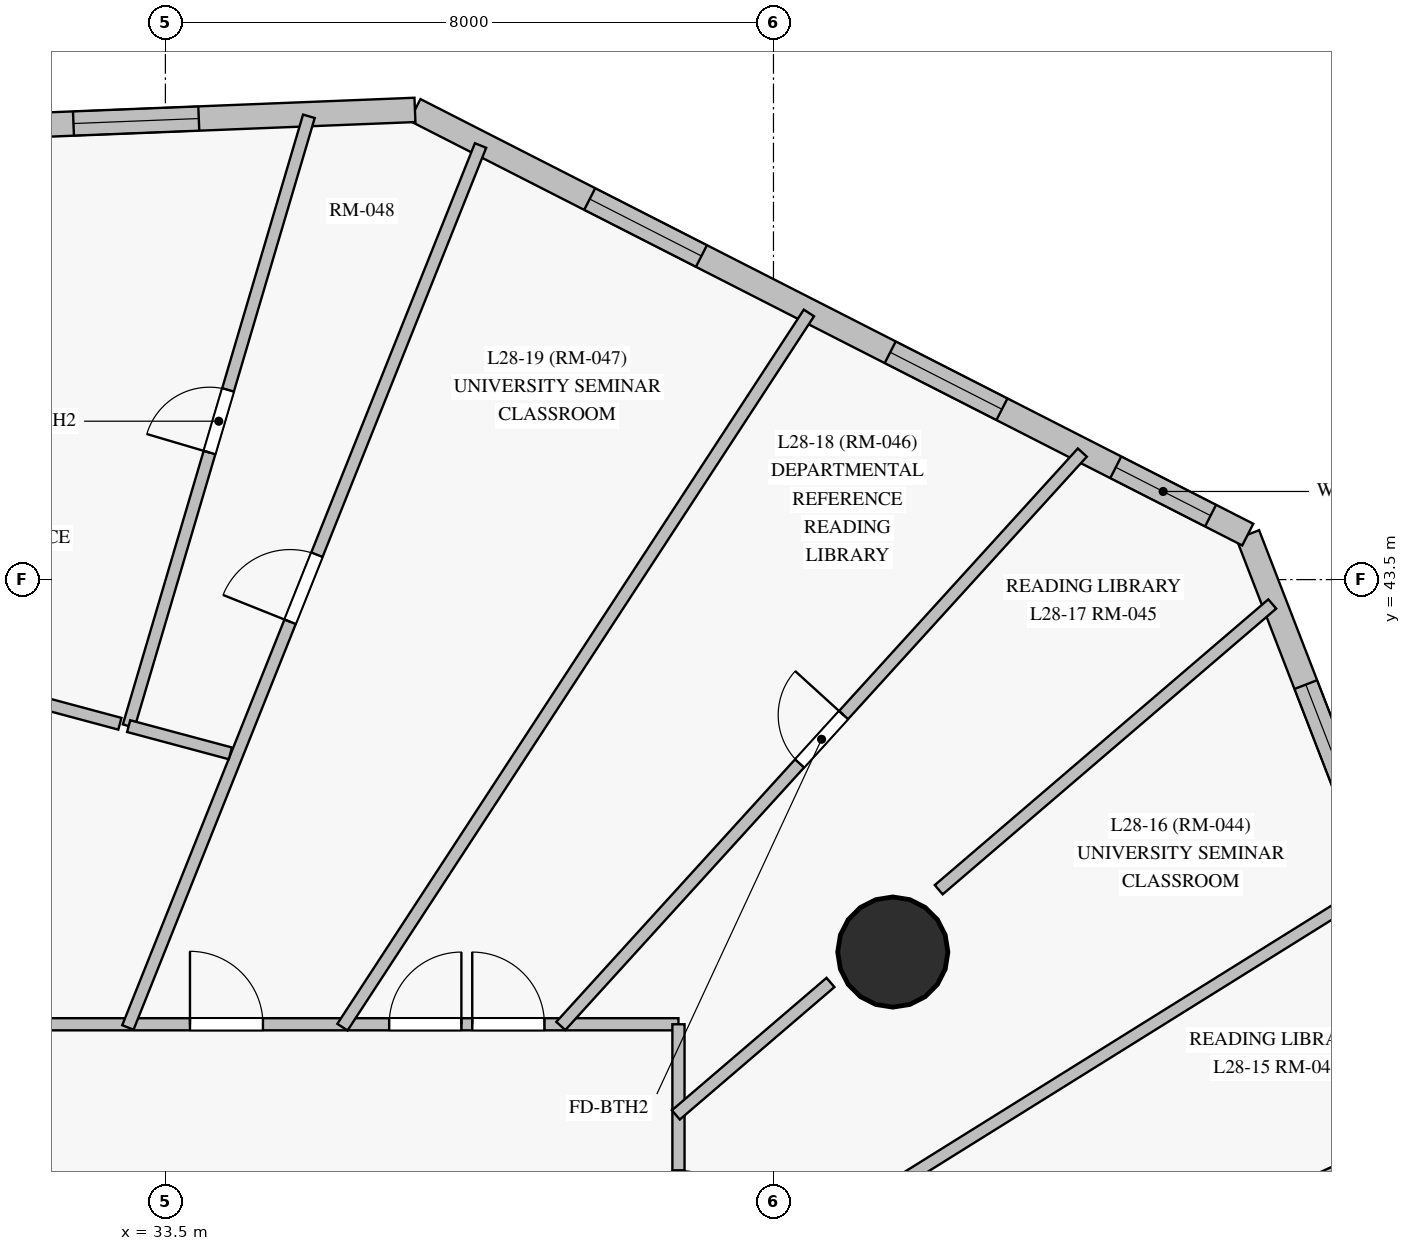
"""IFC4 building model, lengths in metres.
Left out: names, types, materials, properties, quantities, classifications, styles, units other than length and angle.
Written with IfcOpenShell. Run it as: python <this file> out.ifc"""

import sys

from ifc_helpers import new_model, si_unit, direction, frame, frame_2d, origin, origin_with_axes, origin_2d, place, context, subcontext, project, spatial, rectangle, circle, extrude, source, transform, mapped, element, fill, save


model = new_model("IFC4")
c1 = context("Model", 3, precision=1e-05, world=origin(), true_north=direction((0.0, 1.0)))
c2 = subcontext(c1, "Body", "Model", "MODEL_VIEW")
j1 = project(units=[si_unit("LENGTHUNIT", "METRE"), si_unit("PLANEANGLEUNIT", "RADIAN")], contexts=[c1])
p1 = place(None, origin())
s1 = spatial("IfcSite", under=j1, at=p1, CompositionType="ELEMENT")
p2 = place(p1, origin())
s2 = spatial("IfcBuilding", under=s1, at=p2, CompositionType="ELEMENT")
p3 = place(p2, frame((0.0, 0.0, 105.35)))
s3 = spatial("IfcBuildingStorey", under=s2, at=p3, CompositionType="ELEMENT", Elevation=105.35)
m1 = source(origin_with_axes(), c2, "Body", "SweptSolid", [
    extrude(circle(Radius=0.725, at=origin_2d()), origin(), (0.0, 0.0, 1.0), 3.05),
])
p4 = place(p3, frame((43.07, 38.6, 0.0), z_axis=(0.0, 0.0, 1.0), x_axis=(1.0, 0.0, 0.0)))
e1 = element("IfcColumn", 1, at=p4, inside=s3, PredefinedType="COLUMN", context=c2, shape_type="MappedRepresentation", body=[
    mapped(m1, transform((0.0, 0.0, 0.0), scale=1.0)),
])
p5 = place(p3, frame((51.296, 34.899, 0.0), z_axis=(0.0, 0.0, 1.0), x_axis=(-0.360827329773, 0.932632638336, 0.0)))
e2 = element("IfcWall", 2, at=p5, inside=s3, PredefinedType="SOLIDWALL", context=c2, shape_type="SweptSolid", body=[
    extrude(rectangle(XDim=9.857, YDim=0.32, at=frame_2d((4.928, 0.0))), origin(), (0.0, 0.0, 1.0), 2.825),
])
p6 = place(p5, frame((2.517, 0.0, 0.85)))
e3 = element("IfcOpeningElement", 3, at=p6, cuts=e2, PredefinedType="OPENING", context=c2, shape_type="SweptSolid", body=[
    extrude(rectangle(XDim=1.65, YDim=1.65, at=frame_2d((0.825, 0.825))), frame((0.0, 0.17, 0.0), z_axis=(0.0, -1.0, 0.0), x_axis=(1.0, 0.0, 0.0)), (0.0, 0.0, 1.0), 0.34),
])
p7 = place(p5, frame((6.091, 0.0, 0.85)))
e4 = element("IfcOpeningElement", 4, at=p7, cuts=e2, PredefinedType="OPENING", context=c2, shape_type="SweptSolid", body=[
    extrude(rectangle(XDim=1.65, YDim=1.65, at=frame_2d((0.825, 0.825))), frame((0.0, 0.17, 0.0), z_axis=(0.0, -1.0, 0.0), x_axis=(1.0, 0.0, 0.0)), (0.0, 0.0, 1.0), 0.34),
])
p8 = place(p3, frame((47.74, 44.092, 0.0), z_axis=(0.0, 0.0, 1.0), x_axis=(-0.890845819917, 0.454305761725, 0.0)))
e5 = element("IfcWall", 5, at=p8, inside=s3, PredefinedType="SOLIDWALL", context=c2, shape_type="SweptSolid", body=[
    extrude(rectangle(XDim=12.299, YDim=0.32, at=frame_2d((6.15, 0.0))), origin(), (0.0, 0.0, 1.0), 2.825),
])
p9 = place(p8, frame((0.549, 0.0, 0.85)))
e6 = element("IfcOpeningElement", 6, at=p9, cuts=e5, PredefinedType="OPENING", context=c2, shape_type="SweptSolid", body=[
    extrude(rectangle(XDim=1.4, YDim=1.65, at=frame_2d((0.7, 0.825))), frame((0.0, 0.17, 0.0), z_axis=(0.0, -1.0, 0.0), x_axis=(1.0, 0.0, 0.0)), (0.0, 0.0, 1.0), 0.34),
])
p10 = place(p8, frame((3.63, 0.0, 0.85)))
e7 = element("IfcOpeningElement", 7, at=p10, cuts=e5, PredefinedType="OPENING", context=c2, shape_type="SweptSolid", body=[
    extrude(rectangle(XDim=1.65, YDim=1.65, at=frame_2d((0.825, 0.825))), frame((0.0, 0.17, 0.0), z_axis=(0.0, -1.0, 0.0), x_axis=(1.0, 0.0, 0.0)), (0.0, 0.0, 1.0), 0.34),
])
p11 = place(p8, frame((8.068, 0.0, 0.85)))
e8 = element("IfcOpeningElement", 8, at=p11, cuts=e5, PredefinedType="OPENING", context=c2, shape_type="SweptSolid", body=[
    extrude(rectangle(XDim=1.65, YDim=1.65, at=frame_2d((0.825, 0.825))), frame((0.0, 0.17, 0.0), z_axis=(0.0, -1.0, 0.0), x_axis=(1.0, 0.0, 0.0)), (0.0, 0.0, 1.0), 0.34),
])
p12 = place(p3, frame((36.783, 49.679, 0.0), z_axis=(0.0, 0.0, 1.0), x_axis=(-0.999202063829, -0.039940401087, 0.0)))
e9 = element("IfcWall", 9, at=p12, inside=s3, PredefinedType="SOLIDWALL", context=c2, shape_type="SweptSolid", body=[
    extrude(rectangle(XDim=9.878, YDim=0.32, at=frame_2d((4.939, 0.0))), origin(), (0.0, 0.0, 1.0), 2.825),
])
p13 = place(p12, frame((2.846, 0.0, 0.85)))
e10 = element("IfcOpeningElement", 10, at=p13, cuts=e9, PredefinedType="OPENING", context=c2, shape_type="SweptSolid", body=[
    extrude(rectangle(XDim=1.65, YDim=1.65, at=frame_2d((0.825, 0.825))), frame((0.0, 0.17, 0.0), z_axis=(0.0, -1.0, 0.0), x_axis=(1.0, 0.0, 0.0)), (0.0, 0.0, 1.0), 0.34),
])
p14 = place(p12, frame((6.731, 0.0, 0.85)))
e11 = element("IfcOpeningElement", 11, at=p14, cuts=e9, PredefinedType="OPENING", context=c2, shape_type="SweptSolid", body=[
    extrude(rectangle(XDim=1.65, YDim=1.65, at=frame_2d((0.825, 0.825))), frame((0.0, 0.17, 0.0), z_axis=(0.0, -1.0, 0.0), x_axis=(1.0, 0.0, 0.0)), (0.0, 0.0, 1.0), 0.34),
])
p15 = place(p3, frame((11.018, 37.65, 0.0), z_axis=(0.0, 0.0, 1.0), x_axis=(1.0, 0.0, 0.0)))
e12 = element("IfcWall", 12, at=p15, inside=s3, PredefinedType="PARTITIONING", context=c2, shape_type="SweptSolid", body=[
    extrude(rectangle(XDim=29.232, YDim=0.16, at=frame_2d((14.616, 0.0))), origin(), (0.0, 0.0, 1.0), 2.325),
])
p16 = place(p15, frame((26.519, 0.0, 0.0)))
e13 = element("IfcOpeningElement", 13, at=p16, cuts=e12, PredefinedType="OPENING", context=c2, shape_type="SweptSolid", body=[
    extrude(rectangle(XDim=0.95, YDim=2.15, at=frame_2d((0.475, 1.075))), frame((0.0, 0.09, 0.0), z_axis=(0.0, -1.0, 0.0), x_axis=(1.0, 0.0, 0.0)), (0.0, 0.0, 1.0), 0.18),
])
p17 = place(p15, frame((25.426, 0.0, 0.0)))
e14 = element("IfcOpeningElement", 14, at=p17, cuts=e12, PredefinedType="OPENING", context=c2, shape_type="SweptSolid", body=[
    extrude(rectangle(XDim=0.95, YDim=2.15, at=frame_2d((0.475, 1.075))), frame((0.0, 0.09, 0.0), z_axis=(0.0, -1.0, 0.0), x_axis=(1.0, 0.0, 0.0)), (0.0, 0.0, 1.0), 0.18),
])
p18 = place(p15, frame((22.805, 0.0, 0.0)))
e15 = element("IfcOpeningElement", 15, at=p18, cuts=e12, PredefinedType="OPENING", context=c2, shape_type="SweptSolid", body=[
    extrude(rectangle(XDim=0.96, YDim=2.15, at=frame_2d((0.48, 1.075))), frame((0.0, 0.09, 0.0), z_axis=(0.0, -1.0, 0.0), x_axis=(1.0, 0.0, 0.0)), (0.0, 0.0, 1.0), 0.18),
])
p19 = place(p15, frame((14.375, 0.0, 0.0)))
e16 = element("IfcOpeningElement", 16, at=p19, cuts=e12, PredefinedType="OPENING", context=c2, shape_type="SweptSolid", body=[
    extrude(rectangle(XDim=0.96, YDim=2.15, at=frame_2d((0.48, 1.075))), frame((0.0, 0.09, 0.0), z_axis=(0.0, -1.0, 0.0), x_axis=(1.0, 0.0, 0.0)), (0.0, 0.0, 1.0), 0.18),
])
p20 = place(p15, frame((9.717, 0.0, 0.0)))
e17 = element("IfcOpeningElement", 17, at=p20, cuts=e12, PredefinedType="OPENING", context=c2, shape_type="SweptSolid", body=[
    extrude(rectangle(XDim=0.95, YDim=2.15, at=frame_2d((0.475, 1.075))), frame((0.0, 0.09, 0.0), z_axis=(0.0, -1.0, 0.0), x_axis=(1.0, 0.0, 0.0)), (0.0, 0.0, 1.0), 0.18),
])
p21 = place(p15, frame((10.845, 0.0, 0.0)))
e18 = element("IfcOpeningElement", 18, at=p21, cuts=e12, PredefinedType="OPENING", context=c2, shape_type="SweptSolid", body=[
    extrude(rectangle(XDim=0.96, YDim=2.15, at=frame_2d((0.48, 1.075))), frame((0.0, 0.09, 0.0), z_axis=(0.0, -1.0, 0.0), x_axis=(1.0, 0.0, 0.0)), (0.0, 0.0, 1.0), 0.18),
])
p22 = place(p15, frame((1.751, 0.0, 0.0)))
e19 = element("IfcOpeningElement", 19, at=p22, cuts=e12, PredefinedType="OPENING", context=c2, shape_type="SweptSolid", body=[
    extrude(rectangle(XDim=0.86, YDim=2.04, at=frame_2d((0.43, 1.02))), frame((0.0, 0.09, 0.0), z_axis=(0.0, -1.0, 0.0), x_axis=(1.0, 0.0, 0.0)), (0.0, 0.0, 1.0), 0.18),
])
p23 = place(p3, frame((40.25, 37.65, 0.0), z_axis=(0.0, 0.0, 1.0), x_axis=(0.0, -1.0, 0.0)))
e20 = element("IfcWall", 20, at=p23, inside=s3, PredefinedType="PARTITIONING", context=c2, shape_type="SweptSolid", body=[
    extrude(rectangle(XDim=22.3, YDim=0.16, at=frame_2d((11.15, 0.0))), origin(), (0.0, 0.0, 1.0), 2.225),
])
p24 = place(p23, frame((14.02, 0.0, 0.0)))
e21 = element("IfcOpeningElement", 21, at=p24, cuts=e20, PredefinedType="OPENING", context=c2, shape_type="SweptSolid", body=[
    extrude(rectangle(XDim=0.95, YDim=2.15, at=frame_2d((0.475, 1.075))), frame((0.0, 0.09, 0.0), z_axis=(0.0, -1.0, 0.0), x_axis=(1.0, 0.0, 0.0)), (0.0, 0.0, 1.0), 0.18),
])
p25 = place(p23, frame((10.675, 0.0, 0.0)))
e22 = element("IfcOpeningElement", 22, at=p25, cuts=e20, PredefinedType="OPENING", context=c2, shape_type="SweptSolid", body=[
    extrude(rectangle(XDim=0.95, YDim=2.15, at=frame_2d((0.475, 1.075))), frame((0.0, 0.09, 0.0), z_axis=(0.0, -1.0, 0.0), x_axis=(1.0, 0.0, 0.0)), (0.0, 0.0, 1.0), 0.18),
])
p26 = place(p23, frame((6.207, 0.0, 0.0)))
e23 = element("IfcOpeningElement", 23, at=p26, cuts=e20, PredefinedType="OPENING", context=c2, shape_type="SweptSolid", body=[
    extrude(rectangle(XDim=0.95, YDim=2.15, at=frame_2d((0.475, 1.075))), frame((0.0, 0.09, 0.0), z_axis=(0.0, -1.0, 0.0), x_axis=(1.0, 0.0, 0.0)), (0.0, 0.0, 1.0), 0.18),
])
p27 = place(p23, frame((4.298, 0.0, 0.0)))
e24 = element("IfcOpeningElement", 24, at=p27, cuts=e20, PredefinedType="OPENING", context=c2, shape_type="SweptSolid", body=[
    extrude(rectangle(XDim=0.95, YDim=2.15, at=frame_2d((0.475, 1.075))), frame((0.0, 0.09, 0.0), z_axis=(0.0, -1.0, 0.0), x_axis=(1.0, 0.0, 0.0)), (0.0, 0.0, 1.0), 0.18),
])
p28 = place(p23, frame((1.923, 0.0, 0.0)))
e25 = element("IfcOpeningElement", 25, at=p28, cuts=e20, PredefinedType="OPENING", context=c2, shape_type="SweptSolid", body=[
    extrude(rectangle(XDim=0.96, YDim=2.15, at=frame_2d((0.48, 1.075))), frame((0.0, 0.09, 0.0), z_axis=(0.0, -1.0, 0.0), x_axis=(1.0, 0.0, 0.0)), (0.0, 0.0, 1.0), 0.18),
])
p29 = place(p3, frame((33.007, 37.608, 0.0), z_axis=(0.0, 0.0, 1.0), x_axis=(0.371289618401, 0.928517107687, 0.0)))
e26 = element("IfcWall", 26, at=p29, inside=s3, PredefinedType="PARTITIONING", context=c2, shape_type="SweptSolid", body=[
    extrude(rectangle(XDim=12.496, YDim=0.16, at=frame_2d((6.248, 0.0))), origin(), (0.0, 0.0, 1.0), 2.825),
])
p30 = place(p29, frame((5.748, 0.0, 0.0)))
e27 = element("IfcOpeningElement", 27, at=p30, cuts=e26, PredefinedType="OPENING", context=c2, shape_type="SweptSolid", body=[
    extrude(rectangle(XDim=0.95, YDim=2.15, at=frame_2d((0.475, 1.075))), frame((0.0, 0.09, 0.0), z_axis=(0.0, -1.0, 0.0), x_axis=(1.0, 0.0, 0.0)), (0.0, 0.0, 1.0), 0.18),
])
p31 = place(p3, frame((40.223, 31.765, 0.0), z_axis=(0.0, 0.0, 1.0), x_axis=(0.910305874459, 0.413936245, 0.0)))
e28 = element("IfcWall", 28, at=p31, inside=s3, PredefinedType="PARTITIONING", context=c2, shape_type="SweptSolid", body=[
    extrude(rectangle(XDim=11.453, YDim=0.16, at=frame_2d((5.727, 0.0))), origin(), (0.0, 0.0, 1.0), 2.825),
])
p32 = place(p3, frame((35.83, 37.612, 0.0), z_axis=(0.0, 0.0, 1.0), x_axis=(0.546828428928, 0.837244689034, 0.0)))
e29 = element("IfcWall", 29, at=p32, inside=s3, PredefinedType="PARTITIONING", context=c2, shape_type="SweptSolid", body=[
    extrude(rectangle(XDim=11.222, YDim=0.16, at=frame_2d((5.611, 0.0))), origin(), (0.0, 0.0, 1.0), 2.825),
])
p33 = place(p3, frame((40.225, 33.742, 0.0), z_axis=(0.0, 0.0, 1.0), x_axis=(0.848478174112, 0.52923037333, 0.0)))
e30 = element("IfcWall", 30, at=p33, inside=s3, PredefinedType="PARTITIONING", context=c2, shape_type="SweptSolid", body=[
    extrude(rectangle(XDim=10.91, YDim=0.16, at=frame_2d((5.455, 0.0))), origin(), (0.0, 0.0, 1.0), 2.825),
])
p34 = place(p3, frame((38.702, 37.628, 0.0), z_axis=(0.0, 0.0, 1.0), x_axis=(0.672855104657, 0.739774295402, 0.0)))
e31 = element("IfcWall", 31, at=p34, inside=s3, PredefinedType="PARTITIONING", context=c2, shape_type="SweptSolid", body=[
    extrude(rectangle(XDim=10.197, YDim=0.16, at=frame_2d((5.099, 0.0))), origin(), (0.0, 0.0, 1.0), 2.825),
])
p35 = place(p34, frame((4.668, 0.0, 0.0)))
e32 = element("IfcOpeningElement", 32, at=p35, cuts=e31, PredefinedType="OPENING", context=c2, shape_type="SweptSolid", body=[
    extrude(rectangle(XDim=0.86, YDim=2.04, at=frame_2d((0.43, 1.02))), frame((0.0, 0.09, 0.0), z_axis=(0.0, -1.0, 0.0), x_axis=(1.0, 0.0, 0.0)), (0.0, 0.0, 1.0), 0.18),
])
p36 = place(p3, frame((33.017, 41.573, 0.0), z_axis=(0.0, 0.0, 1.0), x_axis=(0.283401651714, 0.959001305424, 0.0)))
e33 = element("IfcWall", 33, at=p36, inside=s3, PredefinedType="PARTITIONING", context=c2, shape_type="SweptSolid", body=[
    extrude(rectangle(XDim=8.366, YDim=0.16, at=frame_2d((4.183, 0.0))), origin(), (0.0, 0.0, 1.0), 2.825),
])
p37 = place(p36, frame((3.753, 0.0, 0.0)))
e34 = element("IfcOpeningElement", 34, at=p37, cuts=e33, PredefinedType="OPENING", context=c2, shape_type="SweptSolid", body=[
    extrude(rectangle(XDim=0.86, YDim=2.04, at=frame_2d((0.43, 1.02))), frame((0.0, 0.09, 0.0), z_axis=(0.0, -1.0, 0.0), x_axis=(1.0, 0.0, 0.0)), (0.0, 0.0, 1.0), 0.18),
])
p38 = place(p3, frame((43.674, 39.42, 0.0), z_axis=(0.0, 0.0, 1.0), x_axis=(0.759429558406, 0.650589537128, 0.0)))
e35 = element("IfcWall", 35, at=p38, inside=s3, PredefinedType="PARTITIONING", context=c2, shape_type="SweptSolid", body=[
    extrude(rectangle(XDim=5.778, YDim=0.16, at=frame_2d((2.889, 0.0))), origin(), (0.0, 0.0, 1.0), 2.825),
])
p39 = place(p3, frame((32.901, 41.604, 0.0), z_axis=(0.0, 0.0, 1.0), x_axis=(-0.965926524805, 0.25881643819, 0.0)))
e36 = element("IfcWall", 36, at=p39, inside=s3, PredefinedType="PARTITIONING", context=c2, shape_type="SweptSolid", body=[
    extrude(rectangle(XDim=4.556, YDim=0.16, at=frame_2d((2.278, 0.0))), origin(), (0.0, 0.0, 1.0), 2.325),
])
p40 = place(p3, frame((40.216, 36.458, 0.0), z_axis=(0.0, 0.0, 1.0), x_axis=(0.75946888982, 0.650543622977, 0.0)))
e37 = element("IfcWall", 37, at=p40, inside=s3, PredefinedType="PARTITIONING", context=c2, shape_type="SweptSolid", body=[
    extrude(rectangle(XDim=2.678, YDim=0.16, at=frame_2d((1.339, 0.0))), origin(), (0.0, 0.0, 1.0), 2.225),
])
p41 = place(p3, frame((34.355, 41.214, 0.0), z_axis=(0.0, 0.0, 1.0), x_axis=(-0.96594175785, 0.258759580387, 0.0)))
e38 = element("IfcWall", 38, at=p41, inside=s3, PredefinedType="PARTITIONING", context=c2, shape_type="SweptSolid", body=[
    extrude(rectangle(XDim=1.385, YDim=0.16, at=frame_2d((0.692, 0.0))), origin(), (0.0, 0.0, 1.0), 2.325),
])
m2 = source(origin_with_axes(), c2, "Body", "SweptSolid", [
    extrude(rectangle(XDim=1.65, YDim=1.65, at=frame_2d((0.825, 0.825))), frame((0.0, 0.03, 0.0), z_axis=(0.0, -1.0, 0.0), x_axis=(1.0, 0.0, 0.0)), (0.0, 0.0, 1.0), 0.06),
])
p42 = place(p7, origin())
e39 = element("IfcWindow", 39, at=p42, inside=s3, PartitioningType="SINGLE_PANEL", PredefinedType="WINDOW", context=c2, shape_type="MappedRepresentation", body=[
    mapped(m2, transform((0.0, 0.0, 0.0), scale=1.0)),
])
fill(e4, e39)
m3 = source(origin_with_axes(), c2, "Body", "SweptSolid", [
    extrude(rectangle(XDim=1.4, YDim=1.65, at=frame_2d((0.7, 0.825))), frame((0.0, 0.03, 0.0), z_axis=(0.0, -1.0, 0.0), x_axis=(1.0, 0.0, 0.0)), (0.0, 0.0, 1.0), 0.06),
])
p43 = place(p9, origin())
e40 = element("IfcWindow", 40, at=p43, inside=s3, PartitioningType="SINGLE_PANEL", PredefinedType="WINDOW", context=c2, shape_type="MappedRepresentation", body=[
    mapped(m3, transform((0.0, 0.0, 0.0), scale=1.0)),
])
fill(e6, e40)
p44 = place(p10, origin())
e41 = element("IfcWindow", 41, at=p44, inside=s3, PartitioningType="SINGLE_PANEL", PredefinedType="WINDOW", context=c2, shape_type="MappedRepresentation", body=[
    mapped(m2, transform((0.0, 0.0, 0.0), scale=1.0)),
])
fill(e7, e41)
p45 = place(p11, origin())
e42 = element("IfcWindow", 42, at=p45, inside=s3, PartitioningType="SINGLE_PANEL", PredefinedType="WINDOW", context=c2, shape_type="MappedRepresentation", body=[
    mapped(m2, transform((0.0, 0.0, 0.0), scale=1.0)),
])
fill(e8, e42)
p46 = place(p13, origin())
e43 = element("IfcWindow", 43, at=p46, inside=s3, PartitioningType="SINGLE_PANEL", PredefinedType="WINDOW", context=c2, shape_type="MappedRepresentation", body=[
    mapped(m2, transform((0.0, 0.0, 0.0), scale=1.0)),
])
fill(e10, e43)
m4 = source(origin_with_axes(), c2, "Body", "SweptSolid", [
    extrude(rectangle(XDim=0.96, YDim=2.15, at=frame_2d((0.48, 1.075))), frame((0.0, 0.025, 0.0), z_axis=(0.0, -1.0, 0.0), x_axis=(1.0, 0.0, 0.0)), (0.0, 0.0, 1.0), 0.05),
])
p47 = place(p28, origin())
e44 = element("IfcDoor", 44, at=p47, inside=s3, OperationType="SINGLE_SWING_RIGHT", PredefinedType="DOOR", context=c2, shape_type="MappedRepresentation", body=[
    mapped(m4, transform((0.0, 0.0, 0.0), scale=1.0)),
])
fill(e25, e44)
m5 = source(origin_with_axes(), c2, "Body", "SweptSolid", [
    extrude(rectangle(XDim=0.95, YDim=2.15, at=frame_2d((0.475, 1.075))), frame((0.0, 0.025, 0.0), z_axis=(0.0, -1.0, 0.0), x_axis=(1.0, 0.0, 0.0)), (0.0, 0.0, 1.0), 0.05),
])
p48 = place(p16, origin())
e45 = element("IfcDoor", 45, at=p48, inside=s3, OperationType="SINGLE_SWING_LEFT", PredefinedType="DOOR", context=c2, shape_type="MappedRepresentation", body=[
    mapped(m5, transform((0.0, 0.0, 0.0), scale=1.0)),
])
fill(e13, e45)
p49 = place(p17, origin())
e46 = element("IfcDoor", 46, at=p49, inside=s3, OperationType="SINGLE_SWING_RIGHT", PredefinedType="DOOR", context=c2, shape_type="MappedRepresentation", body=[
    mapped(m5, transform((0.0, 0.0, 0.0), scale=1.0)),
])
fill(e14, e46)
p50 = place(p18, origin())
e47 = element("IfcDoor", 47, at=p50, inside=s3, OperationType="SINGLE_SWING_LEFT", PredefinedType="DOOR", context=c2, shape_type="MappedRepresentation", body=[
    mapped(m4, transform((0.0, 0.0, 0.0), scale=1.0)),
])
fill(e15, e47)
p51 = place(p30, origin())
e48 = element("IfcDoor", 48, at=p51, inside=s3, OperationType="SINGLE_SWING_LEFT", PredefinedType="DOOR", context=c2, shape_type="MappedRepresentation", body=[
    mapped(m5, transform((0.0, 0.0, 0.0), scale=1.0)),
])
fill(e27, e48)
m6 = source(origin_with_axes(), c2, "Body", "SweptSolid", [
    extrude(rectangle(XDim=0.86, YDim=2.04, at=frame_2d((0.43, 1.02))), frame((0.0, 0.025, 0.0), z_axis=(0.0, -1.0, 0.0), x_axis=(1.0, 0.0, 0.0)), (0.0, 0.0, 1.0), 0.05),
])
p52 = place(p35, origin())
e49 = element("IfcDoor", 49, at=p52, inside=s3, OperationType="SINGLE_SWING_RIGHT", PredefinedType="DOOR", context=c2, shape_type="MappedRepresentation", body=[
    mapped(m6, transform((0.0, 0.0, 0.0), scale=1.0)),
])
fill(e32, e49)
p53 = place(p37, origin())
e50 = element("IfcDoor", 50, at=p53, inside=s3, OperationType="SINGLE_SWING_LEFT", PredefinedType="DOOR", context=c2, shape_type="MappedRepresentation", body=[
    mapped(m6, transform((0.0, 0.0, 0.0), scale=1.0)),
])
fill(e34, e50)
save(model, sys.argv[1])
